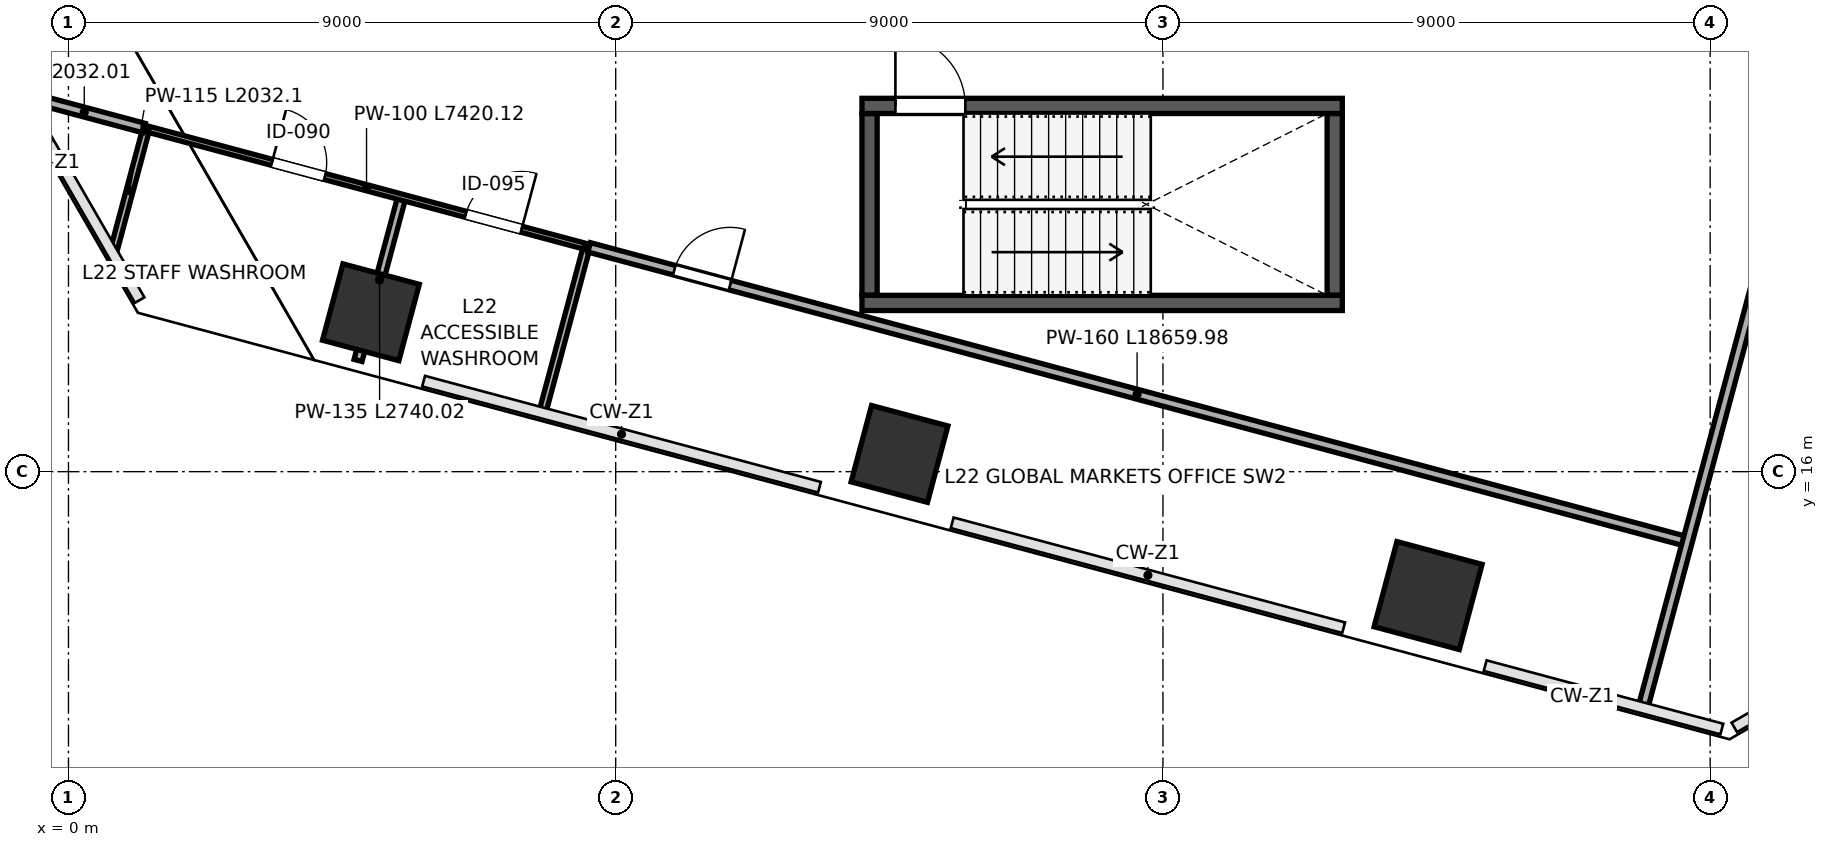
"""IFC4 building model, lengths in metres.
Left out: names, types, materials, properties, quantities, classifications, styles, units other than length and angle.
Written with IfcOpenShell. Run it as: python <this file> out.ifc"""

import sys

from ifc_helpers import new_model, si_unit, direction, frame, frame_2d, origin, origin_2d, place, context, subcontext, project, spatial, rectangle, extrude, source, transform, mapped, element, fill, save


model = new_model("IFC4")
c1 = context("Model", 3, precision=1e-05, world=origin(), true_north=direction((0.0, 1.0)))
c2 = subcontext(c1, "Body", "Model", "MODEL_VIEW")
j1 = project(units=[si_unit("LENGTHUNIT", "METRE"), si_unit("PLANEANGLEUNIT", "RADIAN")], contexts=[c1])
p1 = place(None, origin())
s1 = spatial("IfcSite", under=j1, at=p1, CompositionType="ELEMENT")
p2 = place(p1, origin())
s2 = spatial("IfcBuilding", under=s1, at=p2, CompositionType="ELEMENT")
p3 = place(p2, frame((0.0, 0.0, 100.0)))
s3 = spatial("IfcBuildingStorey", under=s2, at=p3, CompositionType="ELEMENT", Elevation=100.0)
m1 = source(origin(), c2, "Body", "SweptSolid", [
    extrude(rectangle(XDim=1.3, YDim=1.3, at=origin_2d()), origin(), (0.0, 0.0, 1.0), 4.198),
])
for number, where, z_axis, x_axis in (
    (1, (4.974, 18.621, 0.001), (0.0, 0.0, 1.0), (-0.966, 0.259, 0.0)),
    (2, (13.667, 16.292, 0.001), (0.0, 0.0, 1.0), (-0.966, 0.259, 0.0)),
):
    element("IfcColumn", number, at=place(p3, frame(where, z_axis=z_axis, x_axis=x_axis)), inside=s3, PredefinedType="COLUMN", context=c2, shape_type="MappedRepresentation", body=[
        mapped(m1, transform((0.0, 0.0, 0.0), scale=1.0)),
    ])
m2 = source(origin(), c2, "Body", "SweptSolid", [
    extrude(rectangle(XDim=1.45, YDim=1.45, at=origin_2d()), origin(), (0.0, 0.0, 1.0), 4.198),
])
p4 = place(p3, frame((22.361, 13.963, 0.001), z_axis=(0.0, 0.0, 1.0), x_axis=(-0.965925826289, 0.258819045103, 0.0)))
e3 = element("IfcColumn", 3, at=p4, inside=s3, PredefinedType="COLUMN", context=c2, shape_type="MappedRepresentation", body=[
    mapped(m2, transform((0.0, 0.0, 0.0), scale=1.0)),
])
for number, where, z_axis, x_axis in (
    (4, (13.175, 18.9, 0.0), (0.0, 0.0, 1.0), (0.0, 1.0, 0.0)),
    (5, (20.825, 18.9, 0.0), (0.0, 0.0, 1.0), (0.0, 1.0, 0.0)),
):
    element("IfcWall", number, at=place(p3, frame(where, z_axis=z_axis, x_axis=x_axis)), inside=s3, PredefinedType="SHEAR", context=c2, shape_type="SweptSolid", body=[
        extrude(rectangle(XDim=2.99, YDim=0.25, at=frame_2d((1.495, 0.0))), origin(), (0.0, 0.0, 1.0), 3.96),
    ])
p5 = place(p3, frame((13.05, 18.775, 0.0), z_axis=(0.0, 0.0, 1.0), x_axis=(1.0, 0.0, 0.0)))
e6 = element("IfcWall", 6, at=p5, inside=s3, PredefinedType="SHEAR", context=c2, shape_type="SweptSolid", body=[
    extrude(rectangle(XDim=7.9, YDim=0.25, at=frame_2d((3.95, 0.0))), origin(), (0.0, 0.0, 1.0), 3.96),
])
p6 = place(p3, frame((13.05, 22.015, 0.0), z_axis=(0.0, 0.0, 1.0), x_axis=(1.0, 0.0, 0.0)))
e7 = element("IfcWall", 7, at=p6, inside=s3, PredefinedType="SHEAR", context=c2, shape_type="SweptSolid", body=[
    extrude(rectangle(XDim=7.9, YDim=0.25, at=frame_2d((3.95, 0.0))), origin(), (0.0, 0.0, 1.0), 3.96),
])
p7 = place(p6, frame((0.55, 0.0, 0.0)))
e8 = element("IfcOpeningElement", 8, at=p7, cuts=e7, PredefinedType="OPENING", context=c2, shape_type="SweptSolid", body=[
    extrude(rectangle(XDim=1.15, YDim=2.2, at=frame_2d((0.575, 1.1))), frame((0.0, 0.135, 0.0), z_axis=(0.0, -1.0, 0.0), x_axis=(1.0, 0.0, 0.0)), (0.0, 0.0, 1.0), 0.27),
])
p8 = place(p3, frame((0.743, 19.639, 0.0), z_axis=(0.0, 0.0, 1.0), x_axis=(0.258784127083, 0.965935181868, 0.0)))
e9 = element("IfcWall", 9, at=p8, inside=s3, PredefinedType="PARTITIONING", context=c2, shape_type="SweptSolid", body=[
    extrude(rectangle(XDim=2.032, YDim=0.115, at=frame_2d((1.016, 0.0))), origin(), (0.0, 0.0, 1.0), 3.96),
])
p9 = place(p3, frame((-0.722, 22.177, 0.0), z_axis=(0.0, 0.0, 1.0), x_axis=(0.965965207833, -0.258672026426, 0.0)))
e10 = element("IfcWall", 10, at=p9, inside=s3, PredefinedType="PARTITIONING", context=c2, shape_type="SweptSolid", body=[
    extrude(rectangle(XDim=2.032, YDim=0.16, at=frame_2d((1.016, 0.0))), origin(), (0.0, 0.0, 1.0), 3.96),
])
p10 = place(p3, frame((4.762, 17.829, 0.0), z_axis=(0.0, 0.0, 1.0), x_axis=(0.25874944638, 0.965944472523, 0.0)))
e11 = element("IfcWall", 11, at=p10, inside=s3, PredefinedType="PARTITIONING", context=c2, shape_type="SweptSolid", body=[
    extrude(rectangle(XDim=2.74, YDim=0.135, at=frame_2d((1.37, 0.0))), origin(), (0.0, 0.0, 1.0), 3.095),
])
p11 = place(p3, frame((7.805, 17.014, 0.0), z_axis=(0.0, 0.0, 1.0), x_axis=(0.258832579125, 0.965922199757, 0.0)))
e12 = element("IfcWall", 12, at=p11, inside=s3, PredefinedType="PARTITIONING", context=c2, shape_type="SweptSolid", body=[
    extrude(rectangle(XDim=2.74, YDim=0.115, at=frame_2d((1.37, 0.0))), origin(), (0.0, 0.0, 1.0), 3.095),
])
p12 = place(p3, frame((1.318, 21.63, 0.0), z_axis=(0.0, 0.0, 1.0), x_axis=(0.965935568552, -0.258782683744, 0.0)))
e13 = element("IfcWall", 13, at=p12, inside=s3, PredefinedType="PARTITIONING", context=c2, shape_type="SweptSolid", body=[
    extrude(rectangle(XDim=7.42, YDim=0.1, at=frame_2d((3.71, 0.0))), origin(), (0.0, 0.0, 1.0), 3.96),
])
p13 = place(p12, frame((2.1, 0.0, 0.0)))
e14 = element("IfcOpeningElement", 14, at=p13, cuts=e13, PredefinedType="OPENING", context=c2, shape_type="SweptSolid", body=[
    extrude(rectangle(XDim=0.9, YDim=2.15, at=frame_2d((0.45, 1.075))), frame((0.0, 0.06, 0.0), z_axis=(0.0, -1.0, 0.0), x_axis=(1.0, 0.0, 0.0)), (0.0, 0.0, 1.0), 0.12),
])
p14 = place(p12, frame((5.4, 0.0, 0.0)))
e15 = element("IfcOpeningElement", 15, at=p14, cuts=e13, PredefinedType="OPENING", context=c2, shape_type="SweptSolid", body=[
    extrude(rectangle(XDim=0.95, YDim=2.15, at=frame_2d((0.475, 1.075))), frame((0.0, 0.06, 0.0), z_axis=(0.0, -1.0, 0.0), x_axis=(1.0, 0.0, 0.0)), (0.0, 0.0, 1.0), 0.12),
])
p15 = place(p3, frame((8.563, 19.689, 0.0), z_axis=(0.0, 0.0, 1.0), x_axis=(0.965928721089, -0.258808241319, 0.0)))
e16 = element("IfcWall", 16, at=p15, inside=s3, PredefinedType="PARTITIONING", context=c2, shape_type="SweptSolid", body=[
    extrude(rectangle(XDim=18.66, YDim=0.16, at=frame_2d((9.33, 0.0))), origin(), (0.0, 0.0, 1.0), 3.96),
])
p16 = place(p15, frame((1.45, 0.0, 0.0)))
e17 = element("IfcOpeningElement", 17, at=p16, cuts=e16, PredefinedType="OPENING", context=c2, shape_type="SweptSolid", body=[
    extrude(rectangle(XDim=0.95, YDim=2.15, at=frame_2d((0.475, 1.075))), frame((0.0, 0.09, 0.0), z_axis=(0.0, -1.0, 0.0), x_axis=(1.0, 0.0, 0.0)), (0.0, 0.0, 1.0), 0.18),
])
p17 = place(p3, frame((25.906, 12.164, 0.0), z_axis=(0.0, 0.0, 1.0), x_axis=(0.258805595447, 0.965929430013, 0.0)))
e18 = element("IfcWall", 18, at=p17, inside=s3, PredefinedType="PARTITIONING", context=c2, shape_type="SweptSolid", body=[
    extrude(rectangle(XDim=19.78, YDim=0.16, at=frame_2d((9.89, 0.0))), origin(), (0.0, 0.0, 1.0), 3.96),
])
m3 = source(origin(), c2, "Body", "SweptSolid", [
    extrude(rectangle(XDim=1.15, YDim=2.2, at=frame_2d((0.575, 1.1))), frame((0.0, 0.025, 0.0), z_axis=(0.0, -1.0, 0.0), x_axis=(1.0, 0.0, 0.0)), (0.0, 0.0, 1.0), 0.05),
])
p18 = place(p7, origin())
e19 = element("IfcDoor", 19, at=p18, inside=s3, OperationType="SINGLE_SWING_LEFT", PredefinedType="DOOR", context=c2, shape_type="MappedRepresentation", body=[
    mapped(m3, transform((0.0, 0.0, 0.0), scale=1.0)),
])
fill(e8, e19)
m4 = source(origin(), c2, "Body", "SweptSolid", [
    extrude(rectangle(XDim=0.9, YDim=2.15, at=frame_2d((0.45, 1.075))), frame((0.0, 0.025, 0.0), z_axis=(0.0, -1.0, 0.0), x_axis=(1.0, 0.0, 0.0)), (0.0, 0.0, 1.0), 0.05),
])
p19 = place(p13, origin())
e20 = element("IfcDoor", 20, at=p19, inside=s3, OperationType="SINGLE_SWING_LEFT", PredefinedType="DOOR", context=c2, shape_type="MappedRepresentation", body=[
    mapped(m4, transform((0.0, 0.0, 0.0), scale=1.0)),
])
fill(e14, e20)
m5 = source(origin(), c2, "Body", "SweptSolid", [
    extrude(rectangle(XDim=0.95, YDim=2.15, at=frame_2d((0.475, 1.075))), frame((0.0, 0.025, 0.0), z_axis=(0.0, -1.0, 0.0), x_axis=(1.0, 0.0, 0.0)), (0.0, 0.0, 1.0), 0.05),
])
p20 = place(p14, origin())
e21 = element("IfcDoor", 21, at=p20, inside=s3, OperationType="SINGLE_SWING_RIGHT", PredefinedType="DOOR", context=c2, shape_type="MappedRepresentation", body=[
    mapped(m5, transform((0.0, 0.0, 0.0), scale=1.0)),
])
fill(e15, e21)
m6 = source(origin(), c2, "Body", "SweptSolid", [
    extrude(rectangle(XDim=0.95, YDim=2.15, at=frame_2d((0.475, 1.075))), frame((0.0, 0.025, 0.0), z_axis=(0.0, -1.0, 0.0), x_axis=(1.0, 0.0, 0.0)), (0.0, 0.0, 1.0), 0.05),
])
p21 = place(p16, origin())
e22 = element("IfcDoor", 22, at=p21, inside=s3, OperationType="SINGLE_SWING_RIGHT", PredefinedType="DOOR", context=c2, shape_type="MappedRepresentation", body=[
    mapped(m6, transform((0.0, 0.0, 0.0), scale=1.0)),
])
fill(e17, e22)
save(model, sys.argv[1])
